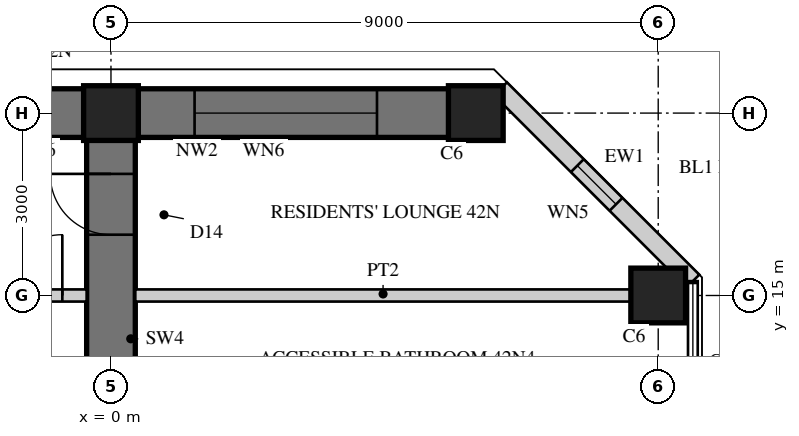
"""IFC4 building model, lengths in metres.
Left out: names, types, materials, properties, quantities, classifications, styles, units other than length and angle.
Written with IfcOpenShell. Run it as: python <this file> out.ifc"""

import sys

from ifc_helpers import new_model, si_unit, direction, frame, frame_2d, origin, origin_2d, place, context, subcontext, project, spatial, rectangle, hollow_rectangle, extrude, element, fill, save


model = new_model("IFC4")
c1 = context("Model", 3, precision=1e-05, world=origin(), true_north=direction((0.0, 1.0)))
c2 = subcontext(c1, "Body", "Model", "MODEL_VIEW")
j1 = project(units=[si_unit("LENGTHUNIT", "METRE"), si_unit("PLANEANGLEUNIT", "RADIAN")], contexts=[c1])
p1 = place(None, origin())
s1 = spatial("IfcSite", under=j1, at=p1, CompositionType="ELEMENT")
p2 = place(p1, origin())
s2 = spatial("IfcBuilding", under=s1, at=p2, CompositionType="ELEMENT")
p3 = place(p2, frame((0.0, 0.0, 172.9)))
s3 = spatial("IfcBuildingStorey", under=s2, at=p3, CompositionType="ELEMENT", Elevation=172.9)
p4 = place(p3, frame((0.0, 9.0, 0.0), z_axis=(0.0, 0.0, 1.0), x_axis=(0.0, 1.0, 0.0)))
e1 = element("IfcWall", 1, at=p4, inside=s3, PredefinedType="SHEAR", context=c2, shape_type="SweptSolid", body=[
    extrude(rectangle(XDim=9.0, YDim=0.8, at=frame_2d((4.5, 0.0))), origin(), (0.0, 0.0, 1.0), 3.4),
])
p5 = place(p4, frame((3.95, 0.0, 0.0)))
e2 = element("IfcOpeningElement", 2, at=p5, cuts=e1, PredefinedType="OPENING", context=c2, shape_type="SweptSolid", body=[
    extrude(rectangle(XDim=1.0, YDim=2.15, at=frame_2d((0.5, 1.075))), frame((0.0, 0.41, 0.0), z_axis=(0.0, -1.0, 0.0), x_axis=(1.0, 0.0, 0.0)), (0.0, 0.0, 1.0), 0.82),
])
p6 = place(p4, frame((7.0, 0.0, 0.0)))
e3 = element("IfcOpeningElement", 3, at=p6, cuts=e1, PredefinedType="OPENING", context=c2, shape_type="SweptSolid", body=[
    extrude(rectangle(XDim=1.0, YDim=2.2, at=frame_2d((0.5, 1.1))), frame((0.0, 0.41, 0.0), z_axis=(0.0, -1.0, 0.0), x_axis=(1.0, 0.0, 0.0)), (0.0, 0.0, 1.0), 0.82),
])
p7 = place(p3, frame((6.0, 18.0, 0.0), z_axis=(0.0, 0.0, 1.0), x_axis=(-1.0, 0.0, 0.0)))
e4 = element("IfcWall", 4, at=p7, inside=s3, PredefinedType="SHEAR", context=c2, shape_type="SweptSolid", body=[
    extrude(rectangle(XDim=12.0, YDim=0.8, at=frame_2d((6.0, 0.0))), origin(), (0.0, 0.0, 1.0), 3.4),
])
p8 = place(p7, frame((1.625, 0.0, 0.6)))
e5 = element("IfcOpeningElement", 5, at=p8, cuts=e4, PredefinedType="OPENING", context=c2, shape_type="SweptSolid", body=[
    extrude(rectangle(XDim=3.0, YDim=2.4, at=frame_2d((1.5, 1.2))), frame((0.0, 0.41, 0.0), z_axis=(0.0, -1.0, 0.0), x_axis=(1.0, 0.0, 0.0)), (0.0, 0.0, 1.0), 0.82),
])
p9 = place(p7, frame((7.375, 0.0, 0.6)))
e6 = element("IfcOpeningElement", 6, at=p9, cuts=e4, PredefinedType="OPENING", context=c2, shape_type="SweptSolid", body=[
    extrude(rectangle(XDim=3.0, YDim=2.4, at=frame_2d((1.5, 1.2))), frame((0.0, 0.41, 0.0), z_axis=(0.0, -1.0, 0.0), x_axis=(1.0, 0.0, 0.0)), (0.0, 0.0, 1.0), 0.82),
])
for number, where, z_axis, x_axis in (
    (7, (9.0, 15.0, 0.0), (0.0, 0.0, 1.0), (1.0, 0.0, 0.0)),
    (8, (6.0, 18.0, 0.0), (0.0, 0.0, 1.0), (1.0, 0.0, 0.0)),
    (9, (0.0, 18.0, 0.0), (0.0, 0.0, 1.0), (1.0, 0.0, 0.0)),
):
    element("IfcColumn", number, at=place(p3, frame(where, z_axis=z_axis, x_axis=x_axis)), inside=s3, PredefinedType="COLUMN", context=c2, shape_type="SweptSolid", body=[
        extrude(rectangle(XDim=0.9, YDim=0.9, at=origin_2d()), origin(), (0.0, 0.0, 1.0), 3.4),
    ])
p10 = place(p3, frame((9.57, 15.236, 0.0), z_axis=(0.0, 0.0, 1.0), x_axis=(-0.707134062067, 0.707079499254, 0.0)))
e10 = element("IfcWall", 10, at=p10, inside=s3, PredefinedType="SOLIDWALL", context=c2, shape_type="SweptSolid", body=[
    extrude(rectangle(XDim=4.475, YDim=0.3, at=frame_2d((2.237, 0.0))), origin(), (0.0, 0.0, 1.0), 3.22),
])
p11 = place(p10, frame((1.787, 0.0, 0.3)))
e11 = element("IfcOpeningElement", 11, at=p11, cuts=e10, PredefinedType="OPENING", context=c2, shape_type="SweptSolid", body=[
    extrude(rectangle(XDim=0.9, YDim=2.4, at=frame_2d((0.45, 1.2))), frame((0.0, 0.16, 0.0), z_axis=(0.0, -1.0, 0.0), x_axis=(1.0, 0.0, 0.0)), (0.0, 0.0, 1.0), 0.32),
])
p12 = place(p3, frame((8.55, 15.0, 0.0), z_axis=(0.0, 0.0, 1.0), x_axis=(-1.0, 0.0, 0.0)))
e12 = element("IfcWall", 12, at=p12, inside=s3, PredefinedType="SOLIDWALL", context=c2, shape_type="SweptSolid", body=[
    extrude(rectangle(XDim=8.15, YDim=0.2, at=frame_2d((4.075, 0.0))), origin(), (0.0, 0.0, 1.0), 2.47),
])
p13 = place(p3, frame((-0.4, 15.0, 0.0), z_axis=(0.0, 0.0, 1.0), x_axis=(-1.0, 0.0, 0.0)))
e13 = element("IfcWall", 13, at=p13, inside=s3, PredefinedType="SOLIDWALL", context=c2, shape_type="SweptSolid", body=[
    extrude(rectangle(XDim=8.15, YDim=0.2, at=frame_2d((4.075, 0.0))), origin(), (0.0, 0.0, 1.0), 2.47),
])
p14 = place(p13, frame((0.4, 0.0, 0.0)))
e14 = element("IfcOpeningElement", 14, at=p14, cuts=e13, PredefinedType="OPENING", context=c2, shape_type="SweptSolid", body=[
    extrude(rectangle(XDim=1.0, YDim=2.2, at=frame_2d((0.5, 1.1))), frame((0.0, 0.11, 0.0), z_axis=(0.0, -1.0, 0.0), x_axis=(1.0, 0.0, 0.0)), (0.0, 0.0, 1.0), 0.22),
])
p15 = place(p11, origin())
e15 = element("IfcWindow", 15, at=p15, inside=s3, PartitioningType="SINGLE_PANEL", PredefinedType="WINDOW", context=c2, shape_type="SweptSolid", body=[
    extrude(hollow_rectangle(XDim=0.9, YDim=2.4, WallThickness=0.06, at=frame_2d((0.45, 1.2))), frame((0.0, 0.03, 0.0), z_axis=(0.0, -1.0, 0.0), x_axis=(1.0, 0.0, 0.0)), (0.0, 0.0, 1.0), 0.06),
    extrude(rectangle(XDim=0.779, YDim=2.279, at=frame_2d((0.45, 1.2))), frame((0.0, 0.03, 0.0), z_axis=(0.0, -1.0, 0.0), x_axis=(1.0, 0.0, 0.0)), (0.0, 0.0, 1.0), 0.06),
])
fill(e11, e15)
p16 = place(p8, origin())
e16 = element("IfcWindow", 16, at=p16, inside=s3, PartitioningType="SINGLE_PANEL", PredefinedType="WINDOW", context=c2, shape_type="SweptSolid", body=[
    extrude(hollow_rectangle(XDim=3.0, YDim=2.4, WallThickness=0.06, at=frame_2d((1.5, 1.2))), frame((0.0, 0.03, 0.0), z_axis=(0.0, -1.0, 0.0), x_axis=(1.0, 0.0, 0.0)), (0.0, 0.0, 1.0), 0.06),
    extrude(rectangle(XDim=2.879, YDim=2.279, at=frame_2d((1.5, 1.2))), frame((0.0, 0.03, 0.0), z_axis=(0.0, -1.0, 0.0), x_axis=(1.0, 0.0, 0.0)), (0.0, 0.0, 1.0), 0.06),
])
fill(e5, e16)
p17 = place(p14, frame((1.0, 0.0, 0.0), z_axis=(0.0, 0.0, 1.0), x_axis=(-1.0, 0.0, 0.0)))
e17 = element("IfcDoor", 17, at=p17, inside=s3, OperationType="SINGLE_SWING_RIGHT", PredefinedType="DOOR", context=c2, shape_type="SweptSolid", body=[
    extrude(rectangle(XDim=1.0, YDim=2.2, at=frame_2d((0.5, 1.1))), frame((0.0, 0.025, 0.0), z_axis=(0.0, -1.0, 0.0), x_axis=(1.0, 0.0, 0.0)), (0.0, 0.0, 1.0), 0.05),
])
fill(e14, e17)
p18 = place(p6, origin())
e18 = element("IfcDoor", 18, at=p18, inside=s3, OperationType="SINGLE_SWING_RIGHT", PredefinedType="DOOR", context=c2, shape_type="SweptSolid", body=[
    extrude(rectangle(XDim=1.0, YDim=2.2, at=frame_2d((0.5, 1.1))), frame((0.0, 0.025, 0.0), z_axis=(0.0, -1.0, 0.0), x_axis=(1.0, 0.0, 0.0)), (0.0, 0.0, 1.0), 0.05),
])
fill(e3, e18)
save(model, sys.argv[1])
